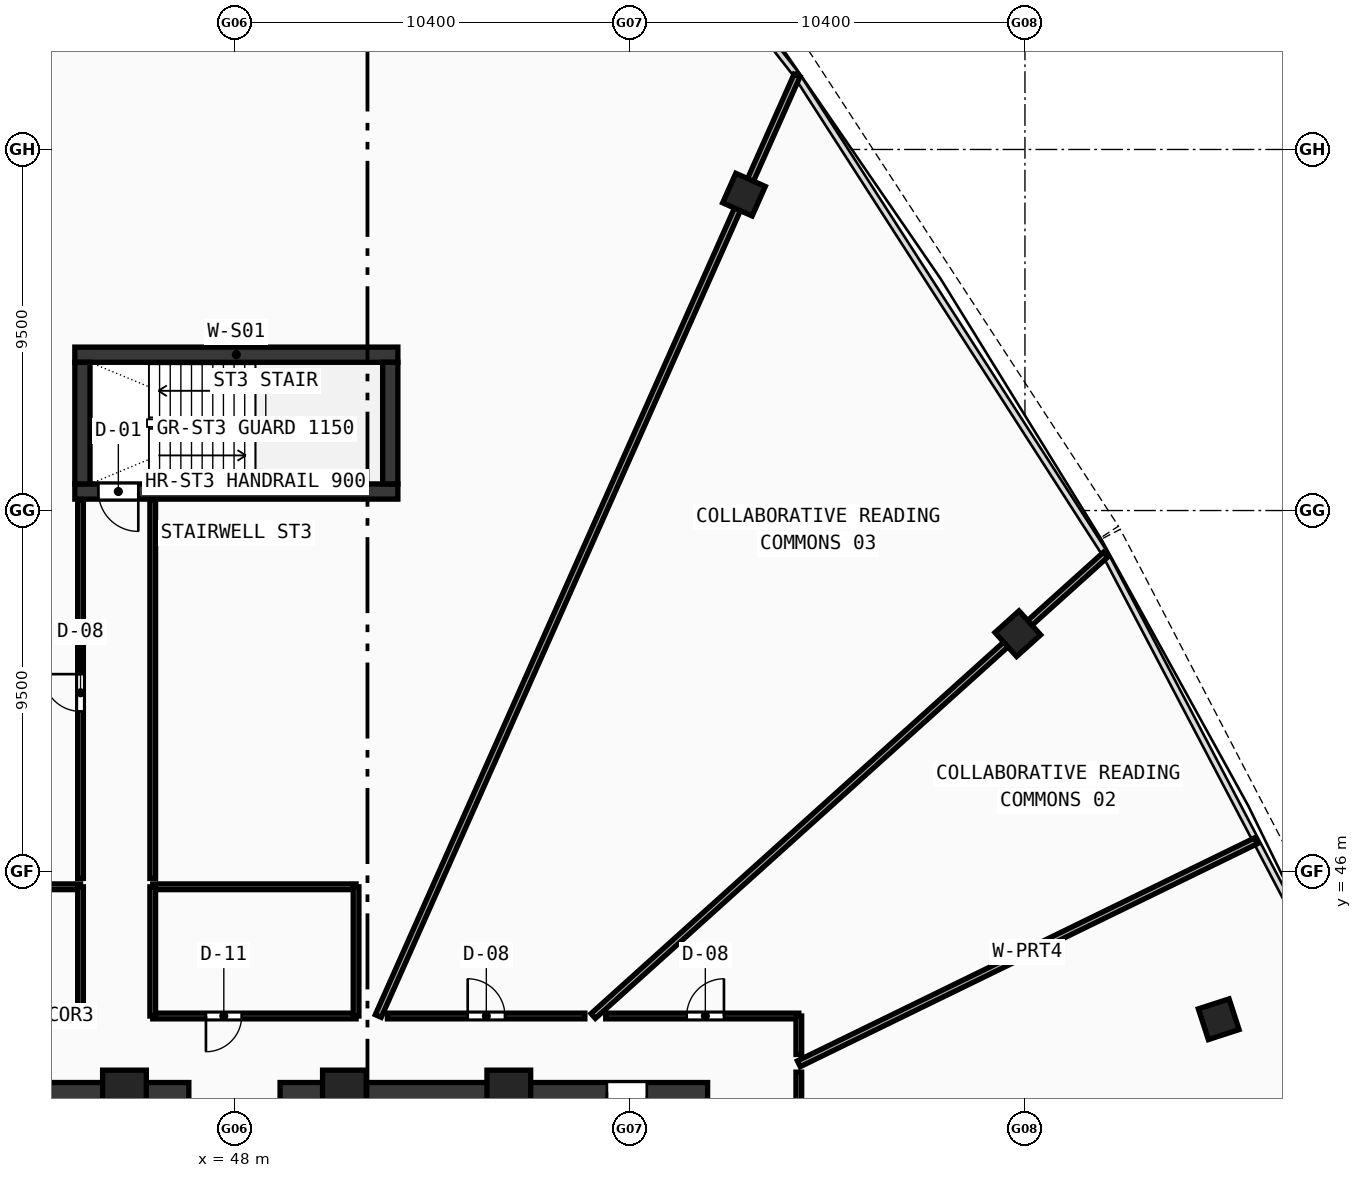
"""IFC4 building model, lengths in metres.
Left out: names, types, materials, properties, quantities, classifications, styles, units other than length and angle.
Written with IfcOpenShell. Run it as: python <this file> out.ifc"""

import sys

from ifc_helpers import new_model, si_unit, direction, frame, frame_2d, origin, origin_with_axes, origin_2d, place, context, subcontext, project, spatial, rectangle, hollow_rectangle, extrude, source, transform, mapped, element, fill, save


model = new_model("IFC4")
c1 = context("Model", 3, precision=1e-05, world=origin(), true_north=direction((0.0, 1.0)))
c2 = subcontext(c1, "Body", "Model", "MODEL_VIEW")
j1 = project(units=[si_unit("LENGTHUNIT", "METRE"), si_unit("PLANEANGLEUNIT", "RADIAN")], contexts=[c1])
p1 = place(None, origin())
s1 = spatial("IfcSite", under=j1, at=p1, CompositionType="ELEMENT")
p2 = place(p1, origin())
s2 = spatial("IfcBuilding", under=s1, at=p2, CompositionType="ELEMENT")
p3 = place(p2, frame((0.0, 0.0, 229.61)))
s3 = spatial("IfcBuildingStorey", under=s2, at=p3, CompositionType="ELEMENT", Elevation=229.61)
p4 = place(p3, frame((35.55, 40.2, 0.0), z_axis=(0.0, 0.0, 1.0), x_axis=(1.0, 0.0, 0.0)))
e1 = element("IfcWall", 1, at=p4, inside=s3, PredefinedType="SHEAR", context=c2, shape_type="SweptSolid", body=[
    extrude(rectangle(XDim=11.25, YDim=0.5, at=frame_2d((5.625, 0.0))), origin(), (0.0, 0.0, 1.0), 3.47),
])
p5 = place(p4, frame((1.6, 0.0, 0.0)))
e2 = element("IfcOpeningElement", 2, at=p5, cuts=e1, PredefinedType="OPENING", context=c2, shape_type="SweptSolid", body=[
    extrude(rectangle(XDim=1.05, YDim=2.1, at=frame_2d((0.525, 1.05))), frame((0.0, 0.26, 0.0), z_axis=(0.0, -1.0, 0.0), x_axis=(1.0, 0.0, 0.0)), (0.0, 0.0, 1.0), 0.52),
])
p6 = place(p3, frame((49.2, 40.2, 0.0), z_axis=(0.0, 0.0, 1.0), x_axis=(1.0, 0.0, 0.0)))
e3 = element("IfcWall", 3, at=p6, inside=s3, PredefinedType="SHEAR", context=c2, shape_type="SweptSolid", body=[
    extrude(rectangle(XDim=11.25, YDim=0.5, at=frame_2d((5.625, 0.0))), origin(), (0.0, 0.0, 1.0), 3.47),
])
p7 = place(p6, frame((8.6, 0.0, 0.0)))
e4 = element("IfcOpeningElement", 4, at=p7, cuts=e3, PredefinedType="OPENING", context=c2, shape_type="SweptSolid", body=[
    extrude(rectangle(XDim=1.05, YDim=2.1, at=frame_2d((0.525, 1.05))), frame((0.0, 0.26, 0.0), z_axis=(0.0, -1.0, 0.0), x_axis=(1.0, 0.0, 0.0)), (0.0, 0.0, 1.0), 0.52),
])
p8 = place(p3, frame((43.8, 59.6, 0.0), z_axis=(0.0, 0.0, 1.0), x_axis=(1.0, 0.0, 0.0)))
e5 = element("IfcWall", 5, at=p8, inside=s3, PredefinedType="SHEAR", context=c2, shape_type="SweptSolid", body=[
    extrude(rectangle(XDim=8.5, YDim=0.4, at=frame_2d((4.25, 0.0))), origin(), (0.0, 0.0, 1.0), 3.47),
])
p9 = place(p3, frame((43.8, 56.0, 0.0), z_axis=(0.0, 0.0, 1.0), x_axis=(1.0, 0.0, 0.0)))
e6 = element("IfcWall", 6, at=p9, inside=s3, PredefinedType="SHEAR", context=c2, shape_type="SweptSolid", body=[
    extrude(rectangle(XDim=8.5, YDim=0.4, at=frame_2d((4.25, 0.0))), origin(), (0.0, 0.0, 1.0), 3.47),
])
p10 = place(p9, frame((0.62, 0.0, 0.0)))
e7 = element("IfcOpeningElement", 7, at=p10, cuts=e6, PredefinedType="OPENING", context=c2, shape_type="SweptSolid", body=[
    extrude(rectangle(XDim=1.05, YDim=2.1, at=frame_2d((0.525, 1.05))), frame((0.0, 0.21, 0.0), z_axis=(0.0, -1.0, 0.0), x_axis=(1.0, 0.0, 0.0)), (0.0, 0.0, 1.0), 0.42),
])
for number, where, z_axis, x_axis in (
    (8, (44.0, 56.2, 0.0), (0.0, 0.0, 1.0), (0.0, 1.0, 0.0)),
    (9, (52.1, 56.2, 0.0), (0.0, 0.0, 1.0), (0.0, 1.0, 0.0)),
):
    element("IfcWall", number, at=place(p3, frame(where, z_axis=z_axis, x_axis=x_axis)), inside=s3, PredefinedType="SHEAR", context=c2, shape_type="SweptSolid", body=[
        extrude(rectangle(XDim=3.2, YDim=0.4, at=frame_2d((1.6, 0.0))), origin(), (0.0, 0.0, 1.0), 3.47),
    ])
m1 = source(origin(), c2, "Body", "SweptSolid", [
    extrude(hollow_rectangle(XDim=1.15, YDim=1.15, WallThickness=0.048, at=origin_2d()), origin(), (0.0, 0.0, 1.0), 3.73),
])
for number, where, z_axis, x_axis in (
    (10, (55.219, 40.2, -0.26), (0.0, 0.0, 1.0), (1.0, 0.0, 0.0)),
    (11, (50.894, 40.2, -0.26), (0.0, 0.0, 1.0), (1.0, 0.0, 0.0)),
    (12, (45.106, 40.2, -0.26), (0.0, 0.0, 1.0), (1.0, 0.0, 0.0)),
):
    element("IfcColumn", number, at=place(p3, frame(where, z_axis=z_axis, x_axis=x_axis)), inside=s3, PredefinedType="COLUMN", context=c2, shape_type="MappedRepresentation", body=[
        mapped(m1, transform((0.0, 0.0, 0.0), scale=1.0)),
    ])
m2 = source(origin(), c2, "Body", "SweptSolid", [
    extrude(hollow_rectangle(XDim=0.85, YDim=0.85, WallThickness=0.034, at=origin_2d()), origin(), (0.0, 0.0, 1.0), 3.73),
])
for number, where, z_axis, x_axis in (
    (13, (73.899, 42.115, -0.26), (0.0, 0.0, 1.0), (-0.309, 0.951, 0.0)),
    (14, (68.612, 52.259, -0.26), (0.0, 0.0, 1.0), (-0.669, 0.743, 0.0)),
    (15, (61.407, 63.812, -0.26), (0.0, 0.0, 1.0), (-0.914, 0.407, 0.0)),
):
    element("IfcColumn", number, at=place(p3, frame(where, z_axis=z_axis, x_axis=x_axis)), inside=s3, PredefinedType="COLUMN", context=c2, shape_type="MappedRepresentation", body=[
        mapped(m2, transform((0.0, 0.0, 0.0), scale=1.0)),
    ])
p11 = place(p3, frame((39.6, 42.2, 0.0), z_axis=(0.0, 0.0, 1.0), x_axis=(1.0, 0.0, 0.0)))
e16 = element("IfcWall", 16, at=p11, inside=s3, PredefinedType="PARTITIONING", context=c2, shape_type="SweptSolid", body=[
    extrude(rectangle(XDim=4.35, YDim=0.15, at=frame_2d((2.175, 0.0))), origin(), (0.0, 0.0, 1.0), 3.47),
])
p12 = place(p11, frame((1.4, 0.0, 0.0)))
e17 = element("IfcOpeningElement", 17, at=p12, cuts=e16, PredefinedType="OPENING", context=c2, shape_type="SweptSolid", body=[
    extrude(rectangle(XDim=0.92, YDim=2.1, at=frame_2d((0.46, 1.05))), frame((0.0, 0.085, 0.0), z_axis=(0.0, -1.0, 0.0), x_axis=(1.0, 0.0, 0.0)), (0.0, 0.0, 1.0), 0.17),
])
p13 = place(p3, frame((39.6, 45.6, 0.0), z_axis=(0.0, 0.0, 1.0), x_axis=(1.0, 0.0, 0.0)))
e18 = element("IfcWall", 18, at=p13, inside=s3, PredefinedType="PARTITIONING", context=c2, shape_type="SweptSolid", body=[
    extrude(rectangle(XDim=4.35, YDim=0.15, at=frame_2d((2.175, 0.0))), origin(), (0.0, 0.0, 1.0), 2.82),
])
p14 = place(p3, frame((43.95, 42.2, 0.0), z_axis=(0.0, 0.0, 1.0), x_axis=(0.0, 1.0, 0.0)))
e19 = element("IfcWall", 19, at=p14, inside=s3, PredefinedType="PARTITIONING", context=c2, shape_type="SweptSolid", body=[
    extrude(rectangle(XDim=3.4, YDim=0.15, at=frame_2d((1.7, 0.0))), origin(), (0.0, 0.0, 1.0), 2.82),
])
p15 = place(p3, frame((45.85, 42.2, 0.0), z_axis=(0.0, 0.0, 1.0), x_axis=(1.0, 0.0, 0.0)))
e20 = element("IfcWall", 20, at=p15, inside=s3, PredefinedType="PARTITIONING", context=c2, shape_type="SweptSolid", body=[
    extrude(rectangle(XDim=5.35, YDim=0.15, at=frame_2d((2.675, 0.0))), origin(), (0.0, 0.0, 1.0), 3.47),
])
p16 = place(p15, frame((1.4, 0.0, 0.0)))
e21 = element("IfcOpeningElement", 21, at=p16, cuts=e20, PredefinedType="OPENING", context=c2, shape_type="SweptSolid", body=[
    extrude(rectangle(XDim=0.94, YDim=2.1, at=frame_2d((0.47, 1.05))), frame((0.0, 0.085, 0.0), z_axis=(0.0, -1.0, 0.0), x_axis=(1.0, 0.0, 0.0)), (0.0, 0.0, 1.0), 0.17),
])
p17 = place(p3, frame((45.85, 45.6, 0.0), z_axis=(0.0, 0.0, 1.0), x_axis=(1.0, 0.0, 0.0)))
e22 = element("IfcWall", 22, at=p17, inside=s3, PredefinedType="PARTITIONING", context=c2, shape_type="SweptSolid", body=[
    extrude(rectangle(XDim=5.35, YDim=0.15, at=frame_2d((2.675, 0.0))), origin(), (0.0, 0.0, 1.0), 3.47),
])
for number, where, z_axis, x_axis in (
    (23, (45.85, 42.2, 0.0), (0.0, 0.0, 1.0), (0.0, 1.0, 0.0)),
    (24, (51.2, 42.2, 0.0), (0.0, 0.0, 1.0), (0.0, 1.0, 0.0)),
):
    element("IfcWall", number, at=place(p3, frame(where, z_axis=z_axis, x_axis=x_axis)), inside=s3, PredefinedType="PARTITIONING", context=c2, shape_type="SweptSolid", body=[
        extrude(rectangle(XDim=3.4, YDim=0.15, at=frame_2d((1.7, 0.0))), origin(), (0.0, 0.0, 1.0), 3.47),
    ])
p18 = place(p3, frame((62.85, 40.943, 0.0), z_axis=(0.0, 0.0, 1.0), x_axis=(0.89879807188, 0.438362893029, 0.0)))
e25 = element("IfcWall", 25, at=p18, inside=s3, PredefinedType="PARTITIONING", context=c2, shape_type="SweptSolid", body=[
    extrude(rectangle(XDim=13.384, YDim=0.17, at=frame_2d((6.692, 0.0))), origin(), (0.0, 0.0, 1.0), 2.82),
])
p19 = place(p3, frame((57.44, 42.2, 0.0), z_axis=(0.0, 0.0, 1.0), x_axis=(0.743147575456, 0.669127552185, 0.0)))
e26 = element("IfcWall", 26, at=p19, inside=s3, PredefinedType="PARTITIONING", context=c2, shape_type="SweptSolid", body=[
    extrude(rectangle(XDim=18.141, YDim=0.17, at=frame_2d((9.07, 0.0))), origin(), (0.0, 0.0, 1.0), 2.82),
])
p20 = place(p3, frame((51.784, 42.2, 0.0), z_axis=(0.0, 0.0, 1.0), x_axis=(0.406737084028, 0.913545261318, 0.0)))
e27 = element("IfcWall", 27, at=p20, inside=s3, PredefinedType="PARTITIONING", context=c2, shape_type="SweptSolid", body=[
    extrude(rectangle(XDim=27.09, YDim=0.17, at=frame_2d((13.545, 0.0))), origin(), (0.0, 0.0, 1.0), 2.82),
])
p21 = place(p3, frame((43.95, 45.82, 0.0), z_axis=(0.0, 0.0, 1.0), x_axis=(0.0, 1.0, 0.0)))
e28 = element("IfcWall", 28, at=p21, inside=s3, PredefinedType="PARTITIONING", context=c2, shape_type="SweptSolid", body=[
    extrude(rectangle(XDim=9.96, YDim=0.15, at=frame_2d((4.98, 0.0))), origin(), (0.0, 0.0, 1.0), 3.12),
])
p22 = place(p21, frame((4.395, 0.0, 0.0)))
e29 = element("IfcOpeningElement", 29, at=p22, cuts=e28, PredefinedType="OPENING", context=c2, shape_type="SweptSolid", body=[
    extrude(rectangle(XDim=0.98, YDim=2.12, at=frame_2d((0.49, 1.06))), frame((0.0, 0.085, 0.0), z_axis=(0.0, -1.0, 0.0), x_axis=(1.0, 0.0, 0.0)), (0.0, 0.0, 1.0), 0.17),
])
p23 = place(p3, frame((45.85, 55.78, 0.0), z_axis=(0.0, 0.0, 1.0), x_axis=(0.0, -1.0, 0.0)))
e30 = element("IfcWall", 30, at=p23, inside=s3, PredefinedType="PARTITIONING", context=c2, shape_type="SweptSolid", body=[
    extrude(rectangle(XDim=9.96, YDim=0.15, at=frame_2d((4.98, 0.0))), origin(), (0.0, 0.0, 1.0), 3.12),
])
p24 = place(p3, frame((52.025, 42.2, 0.0), z_axis=(0.0, 0.0, 1.0), x_axis=(1.0, 0.0, 0.0)))
e31 = element("IfcWall", 31, at=p24, inside=s3, PredefinedType="PARTITIONING", context=c2, shape_type="SweptSolid", body=[
    extrude(rectangle(XDim=5.195, YDim=0.15, at=frame_2d((2.598, 0.0))), origin(), (0.0, 0.0, 1.0), 2.82),
])
p25 = place(p24, frame((2.112, 0.0, 0.0)))
e32 = element("IfcOpeningElement", 32, at=p25, cuts=e31, PredefinedType="OPENING", context=c2, shape_type="SweptSolid", body=[
    extrude(rectangle(XDim=0.98, YDim=2.12, at=frame_2d((0.49, 1.06))), frame((0.0, 0.085, 0.0), z_axis=(0.0, -1.0, 0.0), x_axis=(1.0, 0.0, 0.0)), (0.0, 0.0, 1.0), 0.17),
])
p26 = place(p3, frame((57.769, 42.2, 0.0), z_axis=(0.0, 0.0, 1.0), x_axis=(1.0, 0.0, 0.0)))
e33 = element("IfcWall", 33, at=p26, inside=s3, PredefinedType="PARTITIONING", context=c2, shape_type="SweptSolid", body=[
    extrude(rectangle(XDim=5.081, YDim=0.15, at=frame_2d((2.541, 0.0))), origin(), (0.0, 0.0, 1.0), 3.12),
])
p27 = place(p26, frame((2.131, 0.0, 0.0)))
e34 = element("IfcOpeningElement", 34, at=p27, cuts=e33, PredefinedType="OPENING", context=c2, shape_type="SweptSolid", body=[
    extrude(rectangle(XDim=0.98, YDim=2.12, at=frame_2d((0.49, 1.06))), frame((0.0, 0.085, 0.0), z_axis=(0.0, -1.0, 0.0), x_axis=(1.0, 0.0, 0.0)), (0.0, 0.0, 1.0), 0.17),
])
p28 = place(p3, frame((62.85, 42.2, 0.0), z_axis=(0.0, 0.0, 1.0), x_axis=(0.0, -1.0, 0.0)))
e35 = element("IfcWall", 35, at=p28, inside=s3, PredefinedType="PARTITIONING", context=c2, shape_type="SweptSolid", body=[
    extrude(rectangle(XDim=1.012, YDim=0.15, at=frame_2d((0.506, 0.0))), origin(), (0.0, 0.0, 1.0), 3.12),
])
p29 = place(p3, frame((62.85, 40.723, 0.0), z_axis=(0.0, 0.0, 1.0), x_axis=(0.0, -1.0, 0.0)))
e36 = element("IfcWall", 36, at=p29, inside=s3, PredefinedType="PARTITIONING", context=c2, shape_type="SweptSolid", body=[
    extrude(rectangle(XDim=9.422, YDim=0.15, at=frame_2d((4.711, 0.0))), origin(), (0.0, 0.0, 1.0), 2.82),
])
p30 = place(p29, frame((4.236, 0.0, 0.0)))
e37 = element("IfcOpeningElement", 37, at=p30, cuts=e36, PredefinedType="OPENING", context=c2, shape_type="SweptSolid", body=[
    extrude(rectangle(XDim=0.98, YDim=2.12, at=frame_2d((0.49, 1.06))), frame((0.0, 0.085, 0.0), z_axis=(0.0, -1.0, 0.0), x_axis=(1.0, 0.0, 0.0)), (0.0, 0.0, 1.0), 0.17),
])
m3 = source(origin(), c2, "Body", "SweptSolid", [
    extrude(rectangle(XDim=1.05, YDim=2.1, at=frame_2d((0.525, 1.05))), frame((0.0, 0.025, 0.0), z_axis=(0.0, -1.0, 0.0), x_axis=(1.0, 0.0, 0.0)), (0.0, 0.0, 1.0), 0.05),
])
p31 = place(p7, frame((1.05, 0.0, 0.0), z_axis=(0.0, 0.0, 1.0), x_axis=(-1.0, 0.0, 0.0)))
e38 = element("IfcDoor", 38, at=p31, inside=s3, OperationType="SINGLE_SWING_RIGHT", PredefinedType="DOOR", context=c2, shape_type="MappedRepresentation", body=[
    mapped(m3, transform((0.0, 0.0, 0.0), scale=1.0)),
])
fill(e4, e38)
p32 = place(p10, frame((1.05, 0.0, 0.0), z_axis=(0.0, 0.0, 1.0), x_axis=(-1.0, 0.0, 0.0)))
e39 = element("IfcDoor", 39, at=p32, inside=s3, OperationType="SINGLE_SWING_LEFT", PredefinedType="DOOR", context=c2, shape_type="MappedRepresentation", body=[
    mapped(m3, transform((0.0, 0.0, 0.0), scale=1.0)),
])
fill(e7, e39)
m4 = source(origin(), c2, "Body", "SweptSolid", [
    extrude(rectangle(XDim=0.94, YDim=2.1, at=frame_2d((0.47, 1.05))), frame((0.0, 0.025, 0.0), z_axis=(0.0, -1.0, 0.0), x_axis=(1.0, 0.0, 0.0)), (0.0, 0.0, 1.0), 0.05),
])
p33 = place(p16, frame((0.94, 0.0, 0.0), z_axis=(0.0, 0.0, 1.0), x_axis=(-1.0, 0.0, 0.0)))
e40 = element("IfcDoor", 40, at=p33, inside=s3, OperationType="SINGLE_SWING_RIGHT", PredefinedType="DOOR", context=c2, shape_type="MappedRepresentation", body=[
    mapped(m4, transform((0.0, 0.0, 0.0), scale=1.0)),
])
fill(e21, e40)
m5 = source(origin(), c2, "Body", "SweptSolid", [
    extrude(rectangle(XDim=0.98, YDim=2.12, at=frame_2d((0.49, 1.06))), frame((0.0, 0.025, 0.0), z_axis=(0.0, -1.0, 0.0), x_axis=(1.0, 0.0, 0.0)), (0.0, 0.0, 1.0), 0.05),
])
p34 = place(p27, origin_with_axes())
e41 = element("IfcDoor", 41, at=p34, inside=s3, OperationType="SINGLE_SWING_RIGHT", PredefinedType="DOOR", context=c2, shape_type="MappedRepresentation", body=[
    mapped(m5, transform((0.0, 0.0, 0.0), scale=1.0)),
])
fill(e34, e41)
p35 = place(p25, origin_with_axes())
e42 = element("IfcDoor", 42, at=p35, inside=s3, OperationType="SINGLE_SWING_LEFT", PredefinedType="DOOR", context=c2, shape_type="MappedRepresentation", body=[
    mapped(m5, transform((0.0, 0.0, 0.0), scale=1.0)),
])
fill(e32, e42)
p36 = place(p22, origin_with_axes())
e43 = element("IfcDoor", 43, at=p36, inside=s3, OperationType="SINGLE_SWING_RIGHT", PredefinedType="DOOR", context=c2, shape_type="MappedRepresentation", body=[
    mapped(m5, transform((0.0, 0.0, 0.0), scale=1.0)),
])
fill(e29, e43)
save(model, sys.argv[1])
